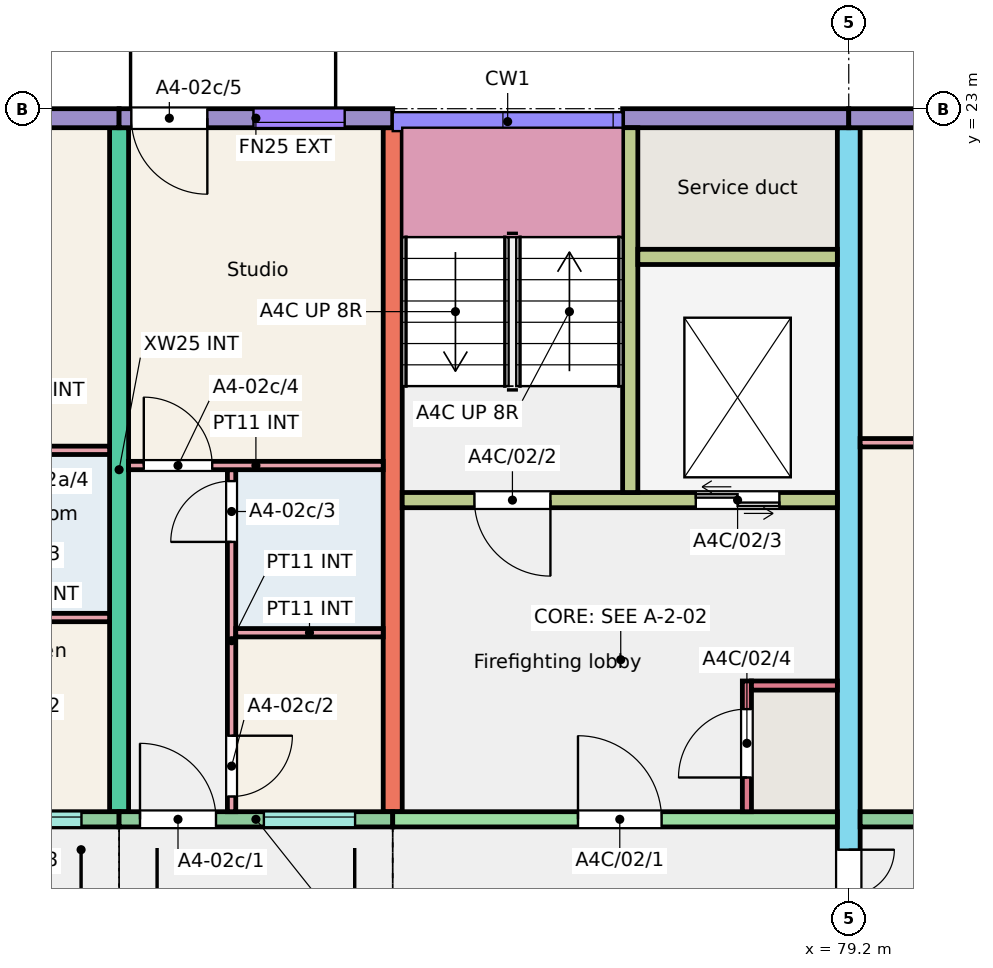
"""IFC4 building model, lengths in metres.
Left out: names, types, materials, properties, quantities, classifications, styles, units other than length and angle.
Written with IfcOpenShell. Run it as: python <this file> out.ifc"""

import sys

from ifc_helpers import new_model, si_unit, direction, frame, frame_2d, origin, place, context, subcontext, project, spatial, rectangle, extrude, element, fill, save


model = new_model("IFC4")
c1 = context("Model", 3, precision=1e-05, world=origin(), true_north=direction((0.0, 1.0)))
c2 = subcontext(c1, "Body", "Model", "MODEL_VIEW")
j1 = project(units=[si_unit("LENGTHUNIT", "METRE"), si_unit("PLANEANGLEUNIT", "RADIAN")], contexts=[c1])
p1 = place(None, origin())
s1 = spatial("IfcSite", under=j1, at=p1, CompositionType="ELEMENT")
p2 = place(p1, origin())
s2 = spatial("IfcBuilding", under=s1, at=p2, CompositionType="ELEMENT")
p3 = place(p2, frame((0.0, 0.0, 6.0)))
s3 = spatial("IfcBuildingStorey", under=s2, at=p3, CompositionType="ELEMENT", Elevation=6.0)
for number, where, z_axis, x_axis in (
    (1, (69.6, 13.75, 0.0), (0.0, 0.0, 1.0), (0.0, 1.0, 0.0)),
    (2, (73.2, 13.75, 0.0), (0.0, 0.0, 1.0), (0.0, 1.0, 0.0)),
):
    element("IfcWall", number, at=place(p3, frame(where, z_axis=z_axis, x_axis=x_axis)), inside=s3, PredefinedType="SHEAR", context=c2, shape_type="SweptSolid", body=[
        extrude(rectangle(XDim=9.0, YDim=0.25, at=frame_2d((4.5, 0.0))), origin(), (0.0, 0.0, 1.0), 3.0),
    ])
p4 = place(p3, frame((79.2, 11.75, 0.0), z_axis=(0.0, 0.0, 1.0), x_axis=(0.0, 1.0, 0.0)))
e3 = element("IfcWall", 3, at=p4, inside=s3, PredefinedType="SHEAR", context=c2, shape_type="SweptSolid", body=[
    extrude(rectangle(XDim=11.0, YDim=0.3, at=frame_2d((5.5, 0.0))), origin(), (0.0, 0.0, 1.0), 3.0),
])
p5 = place(p4, frame((0.3, 0.0, 0.0)))
e4 = element("IfcOpeningElement", 4, at=p5, cuts=e3, PredefinedType="OPENING", context=c2, shape_type="SweptSolid", body=[
    extrude(rectangle(XDim=1.2, YDim=2.1, at=frame_2d((0.6, 1.05))), frame((0.0, 0.16, 0.0), z_axis=(0.0, -1.0, 0.0), x_axis=(1.0, 0.0, 0.0)), (0.0, 0.0, 1.0), 0.32),
])
p6 = place(p3, frame((66.0, 22.875, 0.0), z_axis=(0.0, 0.0, 1.0), x_axis=(1.0, 0.0, 0.0)))
e5 = element("IfcWall", 5, at=p6, inside=s3, PredefinedType="SOLIDWALL", context=c2, shape_type="SweptSolid", body=[
    extrude(rectangle(XDim=3.6, YDim=0.25, at=frame_2d((1.8, 0.0))), origin(), (0.0, 0.0, 1.0), 3.0),
])
p7 = place(p6, frame((1.2, 0.0, 0.8)))
e6 = element("IfcOpeningElement", 6, at=p7, cuts=e5, PredefinedType="OPENING", context=c2, shape_type="SweptSolid", body=[
    extrude(rectangle(XDim=1.2, YDim=1.6, at=frame_2d((0.6, 0.8))), frame((0.0, 0.135, 0.0), z_axis=(0.0, -1.0, 0.0), x_axis=(1.0, 0.0, 0.0)), (0.0, 0.0, 1.0), 0.27),
])
p8 = place(p3, frame((66.0, 13.65, 0.0), z_axis=(0.0, 0.0, 1.0), x_axis=(1.0, 0.0, 0.0)))
e7 = element("IfcWall", 7, at=p8, inside=s3, PredefinedType="SOLIDWALL", context=c2, shape_type="SweptSolid", body=[
    extrude(rectangle(XDim=3.6, YDim=0.2, at=frame_2d((1.8, 0.0))), origin(), (0.0, 0.0, 1.0), 3.0),
])
p9 = place(p8, frame((1.905, 0.0, 1.1)))
e8 = element("IfcOpeningElement", 8, at=p9, cuts=e7, PredefinedType="OPENING", context=c2, shape_type="SweptSolid", body=[
    extrude(rectangle(XDim=1.2, YDim=1.3, at=frame_2d((0.6, 0.65))), frame((0.0, 0.11, 0.0), z_axis=(0.0, -1.0, 0.0), x_axis=(1.0, 0.0, 0.0)), (0.0, 0.0, 1.0), 0.22),
])
p10 = place(p8, frame((0.275, 0.0, 0.0)))
e9 = element("IfcOpeningElement", 9, at=p10, cuts=e7, PredefinedType="OPENING", context=c2, shape_type="SweptSolid", body=[
    extrude(rectangle(XDim=1.0, YDim=2.1, at=frame_2d((0.5, 1.05))), frame((0.0, 0.11, 0.0), z_axis=(0.0, -1.0, 0.0), x_axis=(1.0, 0.0, 0.0)), (0.0, 0.0, 1.0), 0.22),
])
p11 = place(p3, frame((69.6, 22.875, 0.0), z_axis=(0.0, 0.0, 1.0), x_axis=(1.0, 0.0, 0.0)))
e10 = element("IfcWall", 10, at=p11, inside=s3, PredefinedType="SOLIDWALL", context=c2, shape_type="SweptSolid", body=[
    extrude(rectangle(XDim=3.6, YDim=0.25, at=frame_2d((1.8, 0.0))), origin(), (0.0, 0.0, 1.0), 3.0),
])
p12 = place(p11, frame((1.768, 0.0, 0.8)))
e11 = element("IfcOpeningElement", 11, at=p12, cuts=e10, PredefinedType="OPENING", context=c2, shape_type="SweptSolid", body=[
    extrude(rectangle(XDim=1.2, YDim=1.6, at=frame_2d((0.6, 0.8))), frame((0.0, 0.135, 0.0), z_axis=(0.0, -1.0, 0.0), x_axis=(1.0, 0.0, 0.0)), (0.0, 0.0, 1.0), 0.27),
])
p13 = place(p11, frame((0.161, 0.0, 0.0)))
e12 = element("IfcOpeningElement", 12, at=p13, cuts=e10, PredefinedType="OPENING", context=c2, shape_type="SweptSolid", body=[
    extrude(rectangle(XDim=1.0, YDim=2.1, at=frame_2d((0.5, 1.05))), frame((0.0, 0.135, 0.0), z_axis=(0.0, -1.0, 0.0), x_axis=(1.0, 0.0, 0.0)), (0.0, 0.0, 1.0), 0.27),
])
p14 = place(p3, frame((69.6, 13.65, 0.0), z_axis=(0.0, 0.0, 1.0), x_axis=(1.0, 0.0, 0.0)))
e13 = element("IfcWall", 13, at=p14, inside=s3, PredefinedType="SOLIDWALL", context=c2, shape_type="SweptSolid", body=[
    extrude(rectangle(XDim=3.6, YDim=0.2, at=frame_2d((1.8, 0.0))), origin(), (0.0, 0.0, 1.0), 3.0),
])
p15 = place(p14, frame((1.905, 0.0, 1.1)))
e14 = element("IfcOpeningElement", 14, at=p15, cuts=e13, PredefinedType="OPENING", context=c2, shape_type="SweptSolid", body=[
    extrude(rectangle(XDim=1.2, YDim=1.3, at=frame_2d((0.6, 0.65))), frame((0.0, 0.11, 0.0), z_axis=(0.0, -1.0, 0.0), x_axis=(1.0, 0.0, 0.0)), (0.0, 0.0, 1.0), 0.22),
])
p16 = place(p14, frame((0.275, 0.0, 0.0)))
e15 = element("IfcOpeningElement", 15, at=p16, cuts=e13, PredefinedType="OPENING", context=c2, shape_type="SweptSolid", body=[
    extrude(rectangle(XDim=1.0, YDim=2.1, at=frame_2d((0.5, 1.05))), frame((0.0, 0.11, 0.0), z_axis=(0.0, -1.0, 0.0), x_axis=(1.0, 0.0, 0.0)), (0.0, 0.0, 1.0), 0.22),
])
p17 = place(p3, frame((76.225, 22.875, 0.0), z_axis=(0.0, 0.0, 1.0), x_axis=(1.0, 0.0, 0.0)))
e16 = element("IfcWall", 16, at=p17, inside=s3, PredefinedType="SOLIDWALL", context=c2, shape_type="SweptSolid", body=[
    extrude(rectangle(XDim=2.975, YDim=0.25, at=frame_2d((1.487, 0.0))), origin(), (0.0, 0.0, 1.0), 3.0),
])
p18 = place(p3, frame((73.2, 13.65, 0.0), z_axis=(0.0, 0.0, 1.0), x_axis=(1.0, 0.0, 0.0)))
e17 = element("IfcWall", 17, at=p18, inside=s3, PredefinedType="SHEAR", context=c2, shape_type="SweptSolid", body=[
    extrude(rectangle(XDim=5.85, YDim=0.2, at=frame_2d((2.925, 0.0))), origin(), (0.0, 0.0, 1.0), 3.0),
])
p19 = place(p18, frame((2.438, 0.0, 0.0)))
e18 = element("IfcOpeningElement", 18, at=p19, cuts=e17, PredefinedType="OPENING", context=c2, shape_type="SweptSolid", body=[
    extrude(rectangle(XDim=1.1, YDim=2.1, at=frame_2d((0.55, 1.05))), frame((0.0, 0.11, 0.0), z_axis=(0.0, -1.0, 0.0), x_axis=(1.0, 0.0, 0.0)), (0.0, 0.0, 1.0), 0.22),
])
p20 = place(p3, frame((73.325, 17.85, 0.0), z_axis=(0.0, 0.0, 1.0), x_axis=(1.0, 0.0, 0.0)))
e19 = element("IfcWall", 19, at=p20, inside=s3, PredefinedType="SHEAR", context=c2, shape_type="SweptSolid", body=[
    extrude(rectangle(XDim=5.725, YDim=0.2, at=frame_2d((2.863, 0.0))), origin(), (0.0, 0.0, 1.0), 3.0),
])
p21 = place(p20, frame((0.95, 0.0, 0.0)))
e20 = element("IfcOpeningElement", 20, at=p21, cuts=e19, PredefinedType="OPENING", context=c2, shape_type="SweptSolid", body=[
    extrude(rectangle(XDim=1.0, YDim=2.1, at=frame_2d((0.5, 1.05))), frame((0.0, 0.11, 0.0), z_axis=(0.0, -1.0, 0.0), x_axis=(1.0, 0.0, 0.0)), (0.0, 0.0, 1.0), 0.22),
])
p22 = place(p20, frame((3.863, 0.0, 0.0)))
e21 = element("IfcOpeningElement", 21, at=p22, cuts=e19, PredefinedType="OPENING", context=c2, shape_type="SweptSolid", body=[
    extrude(rectangle(XDim=1.1, YDim=2.1, at=frame_2d((0.55, 1.05))), frame((0.0, 0.11, 0.0), z_axis=(0.0, -1.0, 0.0), x_axis=(1.0, 0.0, 0.0)), (0.0, 0.0, 1.0), 0.22),
])
p23 = place(p3, frame((76.325, 17.95, 0.0), z_axis=(0.0, 0.0, 1.0), x_axis=(0.0, 1.0, 0.0)))
e22 = element("IfcWall", 22, at=p23, inside=s3, PredefinedType="SHEAR", context=c2, shape_type="SweptSolid", body=[
    extrude(rectangle(XDim=4.8, YDim=0.2, at=frame_2d((2.4, 0.0))), origin(), (0.0, 0.0, 1.0), 3.0),
])
p24 = place(p3, frame((76.425, 21.05, 0.0), z_axis=(0.0, 0.0, 1.0), x_axis=(1.0, 0.0, 0.0)))
e23 = element("IfcWall", 23, at=p24, inside=s3, PredefinedType="SHEAR", context=c2, shape_type="SweptSolid", body=[
    extrude(rectangle(XDim=2.625, YDim=0.2, at=frame_2d((1.312, 0.0))), origin(), (0.0, 0.0, 1.0), 3.0),
])
p25 = place(p3, frame((77.86, 13.75, 0.0), z_axis=(0.0, 0.0, 1.0), x_axis=(0.0, 1.0, 0.0)))
e24 = element("IfcWall", 24, at=p25, inside=s3, PredefinedType="SHEAR", context=c2, shape_type="SweptSolid", body=[
    extrude(rectangle(XDim=1.72, YDim=0.12, at=frame_2d((0.86, 0.0))), origin(), (0.0, 0.0, 1.0), 3.0),
])
p26 = place(p25, frame((0.45, 0.0, 0.0)))
e25 = element("IfcOpeningElement", 25, at=p26, cuts=e24, PredefinedType="OPENING", context=c2, shape_type="SweptSolid", body=[
    extrude(rectangle(XDim=0.9, YDim=2.1, at=frame_2d((0.45, 1.05))), frame((0.0, 0.07, 0.0), z_axis=(0.0, -1.0, 0.0), x_axis=(1.0, 0.0, 0.0)), (0.0, 0.0, 1.0), 0.14),
])
p27 = place(p3, frame((77.92, 15.41, 0.0), z_axis=(0.0, 0.0, 1.0), x_axis=(1.0, 0.0, 0.0)))
e26 = element("IfcWall", 26, at=p27, inside=s3, PredefinedType="SHEAR", context=c2, shape_type="SweptSolid", body=[
    extrude(rectangle(XDim=1.13, YDim=0.12, at=frame_2d((0.565, 0.0))), origin(), (0.0, 0.0, 1.0), 3.0),
])
p28 = place(p3, frame((79.2, 22.875, 0.0), z_axis=(0.0, 0.0, 1.0), x_axis=(1.0, 0.0, 0.0)))
e27 = element("IfcWall", 27, at=p28, inside=s3, PredefinedType="SOLIDWALL", context=c2, shape_type="SweptSolid", body=[
    extrude(rectangle(XDim=3.6, YDim=0.25, at=frame_2d((1.8, 0.0))), origin(), (0.0, 0.0, 1.0), 3.0),
])
p29 = place(p28, frame((1.212, 0.0, 1.1)))
e28 = element("IfcOpeningElement", 28, at=p29, cuts=e27, PredefinedType="OPENING", context=c2, shape_type="SweptSolid", body=[
    extrude(rectangle(XDim=1.2, YDim=1.3, at=frame_2d((0.6, 0.65))), frame((0.0, 0.135, 0.0), z_axis=(0.0, -1.0, 0.0), x_axis=(1.0, 0.0, 0.0)), (0.0, 0.0, 1.0), 0.27),
])
p30 = place(p3, frame((79.35, 13.65, 0.0), z_axis=(0.0, 0.0, 1.0), x_axis=(1.0, 0.0, 0.0)))
e29 = element("IfcWall", 29, at=p30, inside=s3, PredefinedType="SOLIDWALL", context=c2, shape_type="SweptSolid", body=[
    extrude(rectangle(XDim=3.45, YDim=0.2, at=frame_2d((1.725, 0.0))), origin(), (0.0, 0.0, 1.0), 3.0),
])
p31 = place(p30, frame((1.062, 0.0, 0.8)))
e30 = element("IfcOpeningElement", 30, at=p31, cuts=e29, PredefinedType="OPENING", context=c2, shape_type="SweptSolid", body=[
    extrude(rectangle(XDim=1.2, YDim=1.6, at=frame_2d((0.6, 0.8))), frame((0.0, 0.11, 0.0), z_axis=(0.0, -1.0, 0.0), x_axis=(1.0, 0.0, 0.0)), (0.0, 0.0, 1.0), 0.22),
])
p32 = place(p3, frame((67.535, 16.305, 0.0), z_axis=(0.0, 0.0, 1.0), x_axis=(1.0, 0.0, 0.0)))
e31 = element("IfcWall", 31, at=p32, inside=s3, PredefinedType="PARTITIONING", context=c2, shape_type="SweptSolid", body=[
    extrude(rectangle(XDim=1.94, YDim=0.11, at=frame_2d((0.97, 0.0))), origin(), (0.0, 0.0, 1.0), 2.8),
])
p33 = place(p3, frame((66.125, 18.505, 0.0), z_axis=(0.0, 0.0, 1.0), x_axis=(1.0, 0.0, 0.0)))
e32 = element("IfcWall", 32, at=p33, inside=s3, PredefinedType="PARTITIONING", context=c2, shape_type="SweptSolid", body=[
    extrude(rectangle(XDim=3.35, YDim=0.11, at=frame_2d((1.675, 0.0))), origin(), (0.0, 0.0, 1.0), 2.8),
])
p34 = place(p33, frame((0.2, 0.0, 0.0)))
e33 = element("IfcOpeningElement", 33, at=p34, cuts=e32, PredefinedType="OPENING", context=c2, shape_type="SweptSolid", body=[
    extrude(rectangle(XDim=0.9, YDim=2.1, at=frame_2d((0.45, 1.05))), frame((0.0, 0.065, 0.0), z_axis=(0.0, -1.0, 0.0), x_axis=(1.0, 0.0, 0.0)), (0.0, 0.0, 1.0), 0.13),
])
p35 = place(p3, frame((71.08, 13.75, 0.0), z_axis=(0.0, 0.0, 1.0), x_axis=(0.0, 1.0, 0.0)))
e34 = element("IfcWall", 34, at=p35, inside=s3, PredefinedType="PARTITIONING", context=c2, shape_type="SweptSolid", body=[
    extrude(rectangle(XDim=4.5, YDim=0.11, at=frame_2d((2.25, 0.0))), origin(), (0.0, 0.0, 1.0), 2.8),
])
p36 = place(p35, frame((0.2, 0.0, 0.0)))
e35 = element("IfcOpeningElement", 35, at=p36, cuts=e34, PredefinedType="OPENING", context=c2, shape_type="SweptSolid", body=[
    extrude(rectangle(XDim=0.8, YDim=2.1, at=frame_2d((0.4, 1.05))), frame((0.0, 0.065, 0.0), z_axis=(0.0, -1.0, 0.0), x_axis=(1.0, 0.0, 0.0)), (0.0, 0.0, 1.0), 0.13),
])
p37 = place(p35, frame((3.55, 0.0, 0.0)))
e36 = element("IfcOpeningElement", 36, at=p37, cuts=e34, PredefinedType="OPENING", context=c2, shape_type="SweptSolid", body=[
    extrude(rectangle(XDim=0.8, YDim=2.1, at=frame_2d((0.4, 1.05))), frame((0.0, 0.065, 0.0), z_axis=(0.0, -1.0, 0.0), x_axis=(1.0, 0.0, 0.0)), (0.0, 0.0, 1.0), 0.13),
])
p38 = place(p3, frame((71.135, 16.105, 0.0), z_axis=(0.0, 0.0, 1.0), x_axis=(1.0, 0.0, 0.0)))
e37 = element("IfcWall", 37, at=p38, inside=s3, PredefinedType="PARTITIONING", context=c2, shape_type="SweptSolid", body=[
    extrude(rectangle(XDim=1.94, YDim=0.11, at=frame_2d((0.97, 0.0))), origin(), (0.0, 0.0, 1.0), 2.8),
])
p39 = place(p3, frame((69.725, 18.305, 0.0), z_axis=(0.0, 0.0, 1.0), x_axis=(1.0, 0.0, 0.0)))
e38 = element("IfcWall", 38, at=p39, inside=s3, PredefinedType="PARTITIONING", context=c2, shape_type="SweptSolid", body=[
    extrude(rectangle(XDim=3.35, YDim=0.11, at=frame_2d((1.675, 0.0))), origin(), (0.0, 0.0, 1.0), 2.8),
])
p40 = place(p39, frame((0.2, 0.0, 0.0)))
e39 = element("IfcOpeningElement", 39, at=p40, cuts=e38, PredefinedType="OPENING", context=c2, shape_type="SweptSolid", body=[
    extrude(rectangle(XDim=0.9, YDim=2.1, at=frame_2d((0.45, 1.05))), frame((0.0, 0.065, 0.0), z_axis=(0.0, -1.0, 0.0), x_axis=(1.0, 0.0, 0.0)), (0.0, 0.0, 1.0), 0.13),
])
p41 = place(p3, frame((79.35, 18.605, 0.0), z_axis=(0.0, 0.0, 1.0), x_axis=(1.0, 0.0, 0.0)))
e40 = element("IfcWall", 40, at=p41, inside=s3, PredefinedType="PARTITIONING", context=c2, shape_type="SweptSolid", body=[
    extrude(rectangle(XDim=3.325, YDim=0.11, at=frame_2d((1.663, 0.0))), origin(), (0.0, 0.0, 1.0), 2.8),
])
p42 = place(p9, origin())
e41 = element("IfcWindow", 41, at=p42, inside=s3, PartitioningType="SINGLE_PANEL", PredefinedType="WINDOW", context=c2, shape_type="SweptSolid", body=[
    extrude(rectangle(XDim=1.2, YDim=1.3, at=frame_2d((0.6, 0.65))), frame((0.0, 0.06, 0.0), z_axis=(0.0, -1.0, 0.0), x_axis=(1.0, 0.0, 0.0)), (0.0, 0.0, 1.0), 0.06),
])
fill(e8, e41)
p43 = place(p15, origin())
e42 = element("IfcWindow", 42, at=p43, inside=s3, PartitioningType="SINGLE_PANEL", PredefinedType="WINDOW", context=c2, shape_type="SweptSolid", body=[
    extrude(rectangle(XDim=1.2, YDim=1.3, at=frame_2d((0.6, 0.65))), frame((0.0, 0.06, 0.0), z_axis=(0.0, -1.0, 0.0), x_axis=(1.0, 0.0, 0.0)), (0.0, 0.0, 1.0), 0.06),
])
fill(e14, e42)
p44 = place(p12, origin())
e43 = element("IfcWindow", 43, at=p44, inside=s3, PartitioningType="SINGLE_PANEL", PredefinedType="WINDOW", context=c2, shape_type="SweptSolid", body=[
    extrude(rectangle(XDim=1.2, YDim=1.6, at=frame_2d((0.6, 0.8))), frame((0.0, -0.025, 0.0), z_axis=(0.0, -1.0, 0.0), x_axis=(1.0, 0.0, 0.0)), (0.0, 0.0, 1.0), 0.06),
])
fill(e11, e43)
p45 = place(p16, origin())
e44 = element("IfcDoor", 44, at=p45, inside=s3, OperationType="SINGLE_SWING_LEFT", PredefinedType="DOOR", context=c2, shape_type="SweptSolid", body=[
    extrude(rectangle(XDim=1.0, YDim=2.1, at=frame_2d((0.5, 1.05))), frame((0.0, 0.025, 0.0), z_axis=(0.0, -1.0, 0.0), x_axis=(1.0, 0.0, 0.0)), (0.0, 0.0, 1.0), 0.05),
])
fill(e15, e44)
p46 = place(p36, origin())
e45 = element("IfcDoor", 45, at=p46, inside=s3, OperationType="SINGLE_SWING_RIGHT", PredefinedType="DOOR", context=c2, shape_type="SweptSolid", body=[
    extrude(rectangle(XDim=0.8, YDim=2.1, at=frame_2d((0.4, 1.05))), frame((0.0, 0.025, 0.0), z_axis=(0.0, -1.0, 0.0), x_axis=(1.0, 0.0, 0.0)), (0.0, 0.0, 1.0), 0.05),
])
fill(e35, e45)
p47 = place(p37, origin())
e46 = element("IfcDoor", 46, at=p47, inside=s3, OperationType="SINGLE_SWING_LEFT", PredefinedType="DOOR", context=c2, shape_type="SweptSolid", body=[
    extrude(rectangle(XDim=0.8, YDim=2.1, at=frame_2d((0.4, 1.05))), frame((0.0, 0.025, 0.0), z_axis=(0.0, -1.0, 0.0), x_axis=(1.0, 0.0, 0.0)), (0.0, 0.0, 1.0), 0.05),
])
fill(e36, e46)
p48 = place(p40, origin())
e47 = element("IfcDoor", 47, at=p48, inside=s3, OperationType="SINGLE_SWING_LEFT", PredefinedType="DOOR", context=c2, shape_type="SweptSolid", body=[
    extrude(rectangle(XDim=0.9, YDim=2.1, at=frame_2d((0.45, 1.05))), frame((0.0, 0.025, 0.0), z_axis=(0.0, -1.0, 0.0), x_axis=(1.0, 0.0, 0.0)), (0.0, 0.0, 1.0), 0.05),
])
fill(e39, e47)
p49 = place(p13, origin())
e48 = element("IfcDoor", 48, at=p49, inside=s3, OperationType="SINGLE_SWING_RIGHT", PredefinedType="DOOR", context=c2, shape_type="SweptSolid", body=[
    extrude(rectangle(XDim=1.0, YDim=2.1, at=frame_2d((0.5, 1.05))), frame((0.0, 0.025, 0.0), z_axis=(0.0, -1.0, 0.0), x_axis=(1.0, 0.0, 0.0)), (0.0, 0.0, 1.0), 0.05),
])
fill(e12, e48)
p50 = place(p19, origin())
e49 = element("IfcDoor", 49, at=p50, inside=s3, OperationType="SINGLE_SWING_LEFT", PredefinedType="DOOR", context=c2, shape_type="SweptSolid", body=[
    extrude(rectangle(XDim=1.1, YDim=2.1, at=frame_2d((0.55, 1.05))), frame((0.0, 0.025, 0.0), z_axis=(0.0, -1.0, 0.0), x_axis=(1.0, 0.0, 0.0)), (0.0, 0.0, 1.0), 0.05),
])
fill(e18, e49)
p51 = place(p21, origin())
e50 = element("IfcDoor", 50, at=p51, inside=s3, OperationType="SINGLE_SWING_RIGHT", PredefinedType="DOOR", context=c2, shape_type="SweptSolid", body=[
    extrude(rectangle(XDim=1.0, YDim=2.1, at=frame_2d((0.5, 1.05))), frame((0.0, 0.025, 0.0), z_axis=(0.0, -1.0, 0.0), x_axis=(1.0, 0.0, 0.0)), (0.0, 0.0, 1.0), 0.05),
])
fill(e20, e50)
p52 = place(p22, origin())
e51 = element("IfcDoor", 51, at=p52, inside=s3, OperationType="DOUBLE_DOOR_SLIDING", PredefinedType="DOOR", context=c2, shape_type="SweptSolid", body=[
    extrude(rectangle(XDim=1.1, YDim=2.1, at=frame_2d((0.55, 1.05))), frame((0.0, 0.025, 0.0), z_axis=(0.0, -1.0, 0.0), x_axis=(1.0, 0.0, 0.0)), (0.0, 0.0, 1.0), 0.05),
])
fill(e21, e51)
p53 = place(p26, origin())
e52 = element("IfcDoor", 52, at=p53, inside=s3, OperationType="SINGLE_SWING_LEFT", PredefinedType="DOOR", context=c2, shape_type="SweptSolid", body=[
    extrude(rectangle(XDim=0.9, YDim=2.1, at=frame_2d((0.45, 1.05))), frame((0.0, 0.025, 0.0), z_axis=(0.0, -1.0, 0.0), x_axis=(1.0, 0.0, 0.0)), (0.0, 0.0, 1.0), 0.05),
])
fill(e25, e52)
p54 = place(p5, origin())
e53 = element("IfcDoor", 53, at=p54, inside=s3, OperationType="DOUBLE_DOOR_SINGLE_SWING", PredefinedType="DOOR", context=c2, shape_type="SweptSolid", body=[
    extrude(rectangle(XDim=1.2, YDim=2.1, at=frame_2d((0.6, 1.05))), frame((0.0, 0.025, 0.0), z_axis=(0.0, -1.0, 0.0), x_axis=(1.0, 0.0, 0.0)), (0.0, 0.0, 1.0), 0.05),
])
fill(e4, e53)
save(model, sys.argv[1])
